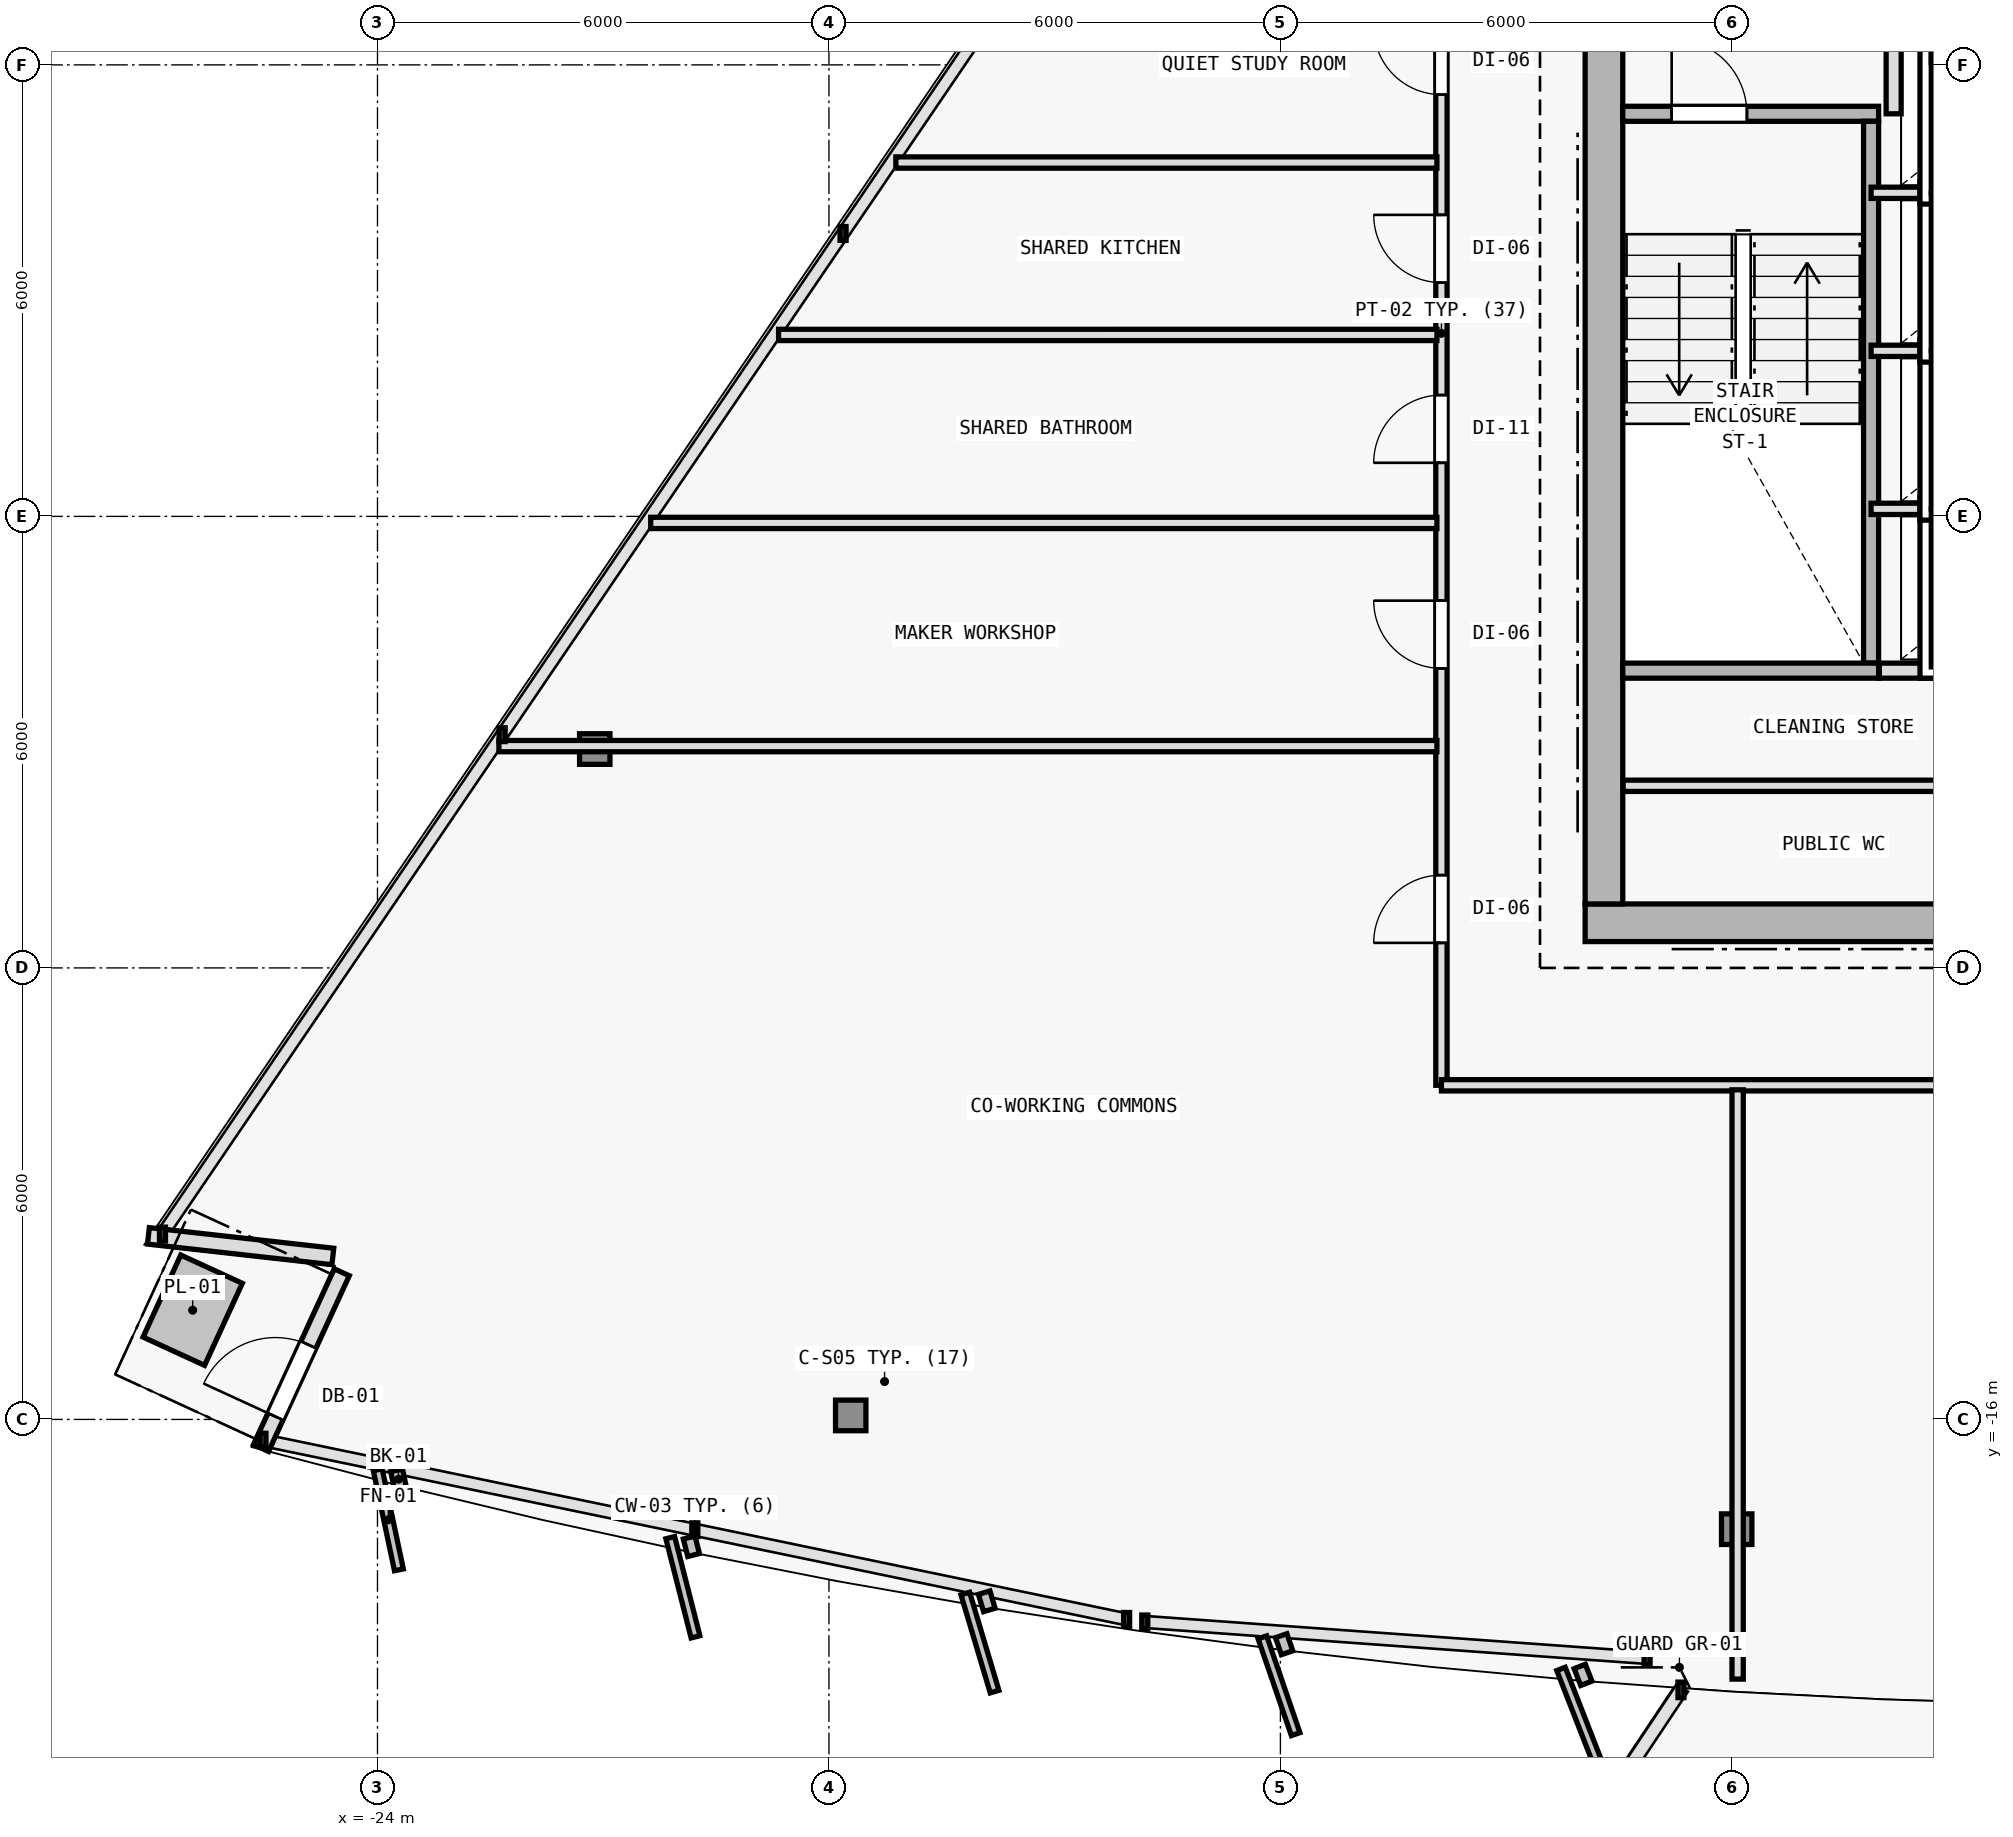
"""IFC4 building model, lengths in metres.
Left out: names, types, materials, properties, quantities, classifications, styles, units other than length and angle.
Written with IfcOpenShell. Run it as: python <this file> out.ifc"""

import sys

from ifc_helpers import new_model, si_unit, direction, frame, frame_2d, origin, origin_2d, place, context, subcontext, project, spatial, rectangle, i_section, extrude, element, fill, save


model = new_model("IFC4")
c1 = context("Model", 3, precision=1e-05, world=origin(), true_north=direction((0.0, 1.0)))
c2 = subcontext(c1, "Body", "Model", "MODEL_VIEW")
j1 = project(units=[si_unit("LENGTHUNIT", "METRE"), si_unit("PLANEANGLEUNIT", "RADIAN")], contexts=[c1])
p1 = place(None, origin())
s1 = spatial("IfcSite", under=j1, at=p1, CompositionType="ELEMENT")
p2 = place(p1, origin())
s2 = spatial("IfcBuilding", under=s1, at=p2, CompositionType="ELEMENT")
p3 = place(p2, frame((0.0, 0.0, 160.2)))
s3 = spatial("IfcBuildingStorey", under=s2, at=p3, CompositionType="ELEMENT", Elevation=160.2)
for number, where, z_axis, x_axis in (
    (1, (-7.7, -9.4, 0.0), (0.0, 0.0, 1.0), (1.0, 0.0, 0.0)),
    (2, (-7.7, 2.0, 0.0), (0.0, 0.0, 1.0), (1.0, 0.0, 0.0)),
):
    element("IfcColumn", number, at=place(p3, frame(where, z_axis=z_axis, x_axis=x_axis)), inside=s3, PredefinedType="COLUMN", context=c2, shape_type="SweptSolid", body=[
        extrude(i_section(OverallWidth=0.404, OverallDepth=0.407, WebThickness=0.017, FlangeThickness=0.028, FilletRadius=0.015, at=origin_2d()), origin(), (0.0, 0.0, 1.0), 3.6),
    ])
p4 = place(p3, frame((-17.711, -15.947, 0.006), z_axis=(0.020596292833, 0.033511459955, 0.999226087917), x_axis=(-0.851954850327, 0.523615252838, 0.0)))
e3 = element("IfcColumn", 3, at=p4, inside=s3, PredefinedType="COLUMN", context=c2, shape_type="SweptSolid", body=[
    extrude(i_section(OverallWidth=0.404, OverallDepth=0.407, WebThickness=0.017, FlangeThickness=0.028, FilletRadius=0.015, at=origin_2d()), origin(), (0.0, 0.0, 1.0), 3.592),
])
p5 = place(p3, frame((-5.936, -17.458, 0.006), z_axis=(0.006934288159, 0.035283289748, 0.999353293441), x_axis=(-0.981229659911, 0.192842823335, 0.0)))
e4 = element("IfcColumn", 4, at=p5, inside=s3, PredefinedType="COLUMN", context=c2, shape_type="SweptSolid", body=[
    extrude(i_section(OverallWidth=0.404, OverallDepth=0.407, WebThickness=0.017, FlangeThickness=0.028, FilletRadius=0.015, at=origin_2d()), origin(), (0.0, 0.0, 1.0), 3.591),
])
p6 = place(p3, frame((-21.112, -7.092, 0.006), z_axis=(0.025224163578, 0.021620711639, 0.999447990843), x_axis=(-0.650791373456, 0.759256602365, 0.0)))
e5 = element("IfcColumn", 5, at=p6, inside=s3, PredefinedType="COLUMN", context=c2, shape_type="SweptSolid", body=[
    extrude(i_section(OverallWidth=0.404, OverallDepth=0.407, WebThickness=0.017, FlangeThickness=0.028, FilletRadius=0.015, at=origin_2d()), origin(), (0.0, 0.0, 1.0), 3.591),
])
p7 = place(p3, frame((-24.594, -13.834, 0.0), z_axis=(0.0, 0.0, 1.0), x_axis=(-0.993823222634, 0.110974781609, 0.0)))
e6 = element("IfcWall", 6, at=p7, inside=s3, PredefinedType="SOLIDWALL", context=c2, shape_type="SweptSolid", body=[
    extrude(rectangle(XDim=2.466, YDim=0.22, at=frame_2d((1.233, 0.0))), origin(), (0.0, 0.0, 1.0), 3.35),
])
p8 = place(p3, frame((-25.548, -16.38, 0.0), z_axis=(0.0, 0.0, 1.0), x_axis=(0.417449299542, 0.908700215864, 0.0)))
e7 = element("IfcWall", 7, at=p8, inside=s3, PredefinedType="SOLIDWALL", context=c2, shape_type="SweptSolid", body=[
    extrude(rectangle(XDim=2.57, YDim=0.22, at=frame_2d((1.285, 0.0))), origin(), (0.0, 0.0, 1.0), 3.35),
])
p9 = place(p8, frame((0.46, 0.0, 0.0)))
e8 = element("IfcOpeningElement", 8, at=p9, cuts=e7, PredefinedType="OPENING", context=c2, shape_type="SweptSolid", body=[
    extrude(rectangle(XDim=1.05, YDim=2.15, at=frame_2d((0.525, 1.075))), frame((0.0, 0.12, 0.0), z_axis=(0.0, -1.0, 0.0), x_axis=(1.0, 0.0, 0.0)), (0.0, 0.0, 1.0), 0.24),
])
p10 = place(p3, frame((-7.95, -9.4, 0.0), z_axis=(0.0, 0.0, 1.0), x_axis=(1.0, 0.0, 0.0)))
e9 = element("IfcWall", 9, at=p10, inside=s3, PredefinedType="SHEAR", context=c2, shape_type="SweptSolid", body=[
    extrude(rectangle(XDim=15.9, YDim=0.5, at=frame_2d((7.95, 0.0))), origin(), (0.0, 0.0, 1.0), 3.35),
])
p11 = place(p10, frame((9.6, 0.0, 0.0)))
e10 = element("IfcOpeningElement", 10, at=p11, cuts=e9, PredefinedType="OPENING", context=c2, shape_type="SweptSolid", body=[
    extrude(rectangle(XDim=1.5, YDim=2.2, at=frame_2d((0.75, 1.1))), frame((0.0, 0.26, 0.0), z_axis=(0.0, -1.0, 0.0), x_axis=(1.0, 0.0, 0.0)), (0.0, 0.0, 1.0), 0.52),
])
p12 = place(p3, frame((-7.7, -9.15, 0.0), z_axis=(0.0, 0.0, 1.0), x_axis=(0.0, 1.0, 0.0)))
e11 = element("IfcWall", 11, at=p12, inside=s3, PredefinedType="SHEAR", context=c2, shape_type="SweptSolid", body=[
    extrude(rectangle(XDim=19.1, YDim=0.5, at=frame_2d((9.55, 0.0))), origin(), (0.0, 0.0, 1.0), 3.35),
])
p13 = place(p12, frame((12.7, 0.0, 0.0)))
e12 = element("IfcOpeningElement", 12, at=p13, cuts=e11, PredefinedType="OPENING", context=c2, shape_type="SweptSolid", body=[
    extrude(rectangle(XDim=1.1, YDim=2.15, at=frame_2d((0.55, 1.075))), frame((0.0, 0.26, 0.0), z_axis=(0.0, -1.0, 0.0), x_axis=(1.0, 0.0, 0.0)), (0.0, 0.0, 1.0), 0.52),
])
p14 = place(p3, frame((-7.45, 1.35, 0.0), z_axis=(0.0, 0.0, 1.0), x_axis=(1.0, 0.0, 0.0)))
e13 = element("IfcWall", 13, at=p14, inside=s3, PredefinedType="SOLIDWALL", context=c2, shape_type="SweptSolid", body=[
    extrude(rectangle(XDim=3.4, YDim=0.2, at=frame_2d((1.7, 0.0))), origin(), (0.0, 0.0, 1.0), 3.35),
])
p15 = place(p14, frame((0.65, 0.0, 0.0)))
e14 = element("IfcOpeningElement", 14, at=p15, cuts=e13, PredefinedType="OPENING", context=c2, shape_type="SweptSolid", body=[
    extrude(rectangle(XDim=1.0, YDim=2.15, at=frame_2d((0.5, 1.075))), frame((0.0, 0.11, 0.0), z_axis=(0.0, -1.0, 0.0), x_axis=(1.0, 0.0, 0.0)), (0.0, 0.0, 1.0), 0.22),
])
p16 = place(p3, frame((-4.15, -5.95, 0.0), z_axis=(0.0, 0.0, 1.0), x_axis=(0.0, 1.0, 0.0)))
e15 = element("IfcWall", 15, at=p16, inside=s3, PredefinedType="SOLIDWALL", context=c2, shape_type="SweptSolid", body=[
    extrude(rectangle(XDim=7.2, YDim=0.2, at=frame_2d((3.6, 0.0))), origin(), (0.0, 0.0, 1.0), 3.35),
])
p17 = place(p3, frame((-3.85, 1.35, 0.0), z_axis=(0.0, 0.0, 1.0), x_axis=(0.0, 1.0, 0.0)))
e16 = element("IfcWall", 16, at=p17, inside=s3, PredefinedType="SOLIDWALL", context=c2, shape_type="SweptSolid", body=[
    extrude(rectangle(XDim=8.595, YDim=0.2, at=frame_2d((4.297, 0.0))), origin(), (0.0, 0.0, 1.0), 3.35),
])
p18 = place(p17, frame((1.5, 0.0, 0.0)))
e17 = element("IfcOpeningElement", 17, at=p18, cuts=e16, PredefinedType="OPENING", context=c2, shape_type="SweptSolid", body=[
    extrude(rectangle(XDim=1.0, YDim=2.15, at=frame_2d((0.5, 1.075))), frame((0.0, 0.11, 0.0), z_axis=(0.0, -1.0, 0.0), x_axis=(1.0, 0.0, 0.0)), (0.0, 0.0, 1.0), 0.22),
])
p19 = place(p17, frame((3.18, 0.0, 0.0)))
e18 = element("IfcOpeningElement", 18, at=p19, cuts=e16, PredefinedType="OPENING", context=c2, shape_type="SweptSolid", body=[
    extrude(rectangle(XDim=1.0, YDim=2.15, at=frame_2d((0.5, 1.075))), frame((0.0, 0.11, 0.0), z_axis=(0.0, -1.0, 0.0), x_axis=(1.0, 0.0, 0.0)), (0.0, 0.0, 1.0), 0.22),
])
for number, where, z_axis, x_axis in (
    (19, (-4.15, -3.9, 0.0), (0.0, 0.0, 1.0), (1.0, 0.0, 0.0)),
    (20, (-4.15, -1.8, 0.0), (0.0, 0.0, 1.0), (1.0, 0.0, 0.0)),
    (21, (-4.15, 0.3, 0.0), (0.0, 0.0, 1.0), (1.0, 0.0, 0.0)),
):
    element("IfcWall", number, at=place(p3, frame(where, z_axis=z_axis, x_axis=x_axis)), inside=s3, PredefinedType="PARTITIONING", context=c2, shape_type="SweptSolid", body=[
        extrude(rectangle(XDim=2.9, YDim=0.15, at=frame_2d((1.45, 0.0))), origin(), (0.0, 0.0, 1.0), 3.35),
    ])
p20 = place(p3, frame((-7.45, -6.05, 0.0), z_axis=(0.0, 0.0, 1.0), x_axis=(1.0, 0.0, 0.0)))
e22 = element("IfcWall", 22, at=p20, inside=s3, PredefinedType="SOLIDWALL", context=c2, shape_type="SweptSolid", body=[
    extrude(rectangle(XDim=3.4, YDim=0.2, at=frame_2d((1.7, 0.0))), origin(), (0.0, 0.0, 1.0), 3.35),
])
p21 = place(p3, frame((-4.04, -6.05, 0.0), z_axis=(0.0, 0.0, 1.0), x_axis=(1.0, 0.0, 0.0)))
e23 = element("IfcWall", 23, at=p21, inside=s3, PredefinedType="SOLIDWALL", context=c2, shape_type="SweptSolid", body=[
    extrude(rectangle(XDim=2.79, YDim=0.2, at=frame_2d((1.395, 0.0))), origin(), (0.0, 0.0, 1.0), 3.35),
])
p22 = place(p3, frame((-7.445, -7.58, 0.0), z_axis=(0.0, 0.0, 1.0), x_axis=(1.0, 0.0, 0.0)))
e24 = element("IfcWall", 24, at=p22, inside=s3, PredefinedType="PARTITIONING", context=c2, shape_type="SweptSolid", body=[
    extrude(rectangle(XDim=6.195, YDim=0.15, at=frame_2d((3.098, 0.0))), origin(), (0.0, 0.0, 1.0), 3.35),
])
p23 = place(p3, frame((-9.86, -11.56, 0.0), z_axis=(0.0, 0.0, 1.0), x_axis=(0.0, 1.0, 0.0)))
e25 = element("IfcWall", 25, at=p23, inside=s3, PredefinedType="PARTITIONING", context=c2, shape_type="SweptSolid", body=[
    extrude(rectangle(XDim=19.986, YDim=0.15, at=frame_2d((9.993, 0.0))), origin(), (0.0, 0.0, 1.0), 2.825),
])
p24 = place(p23, frame((10.667, 0.0, 0.0)))
e26 = element("IfcOpeningElement", 26, at=p24, cuts=e25, PredefinedType="OPENING", context=c2, shape_type="SweptSolid", body=[
    extrude(rectangle(XDim=0.9, YDim=2.1, at=frame_2d((0.45, 1.05))), frame((0.0, 0.085, 0.0), z_axis=(0.0, -1.0, 0.0), x_axis=(1.0, 0.0, 0.0)), (0.0, 0.0, 1.0), 0.17),
])
p25 = place(p23, frame((8.272, 0.0, 0.0)))
e27 = element("IfcOpeningElement", 27, at=p25, cuts=e25, PredefinedType="OPENING", context=c2, shape_type="SweptSolid", body=[
    extrude(rectangle(XDim=0.9, YDim=2.1, at=frame_2d((0.45, 1.05))), frame((0.0, 0.085, 0.0), z_axis=(0.0, -1.0, 0.0), x_axis=(1.0, 0.0, 0.0)), (0.0, 0.0, 1.0), 0.17),
])
p26 = place(p23, frame((5.54, 0.0, 0.0)))
e28 = element("IfcOpeningElement", 28, at=p26, cuts=e25, PredefinedType="OPENING", context=c2, shape_type="SweptSolid", body=[
    extrude(rectangle(XDim=0.9, YDim=2.1, at=frame_2d((0.45, 1.05))), frame((0.0, 0.085, 0.0), z_axis=(0.0, -1.0, 0.0), x_axis=(1.0, 0.0, 0.0)), (0.0, 0.0, 1.0), 0.17),
])
p27 = place(p23, frame((1.893, 0.0, 0.0)))
e29 = element("IfcOpeningElement", 29, at=p27, cuts=e25, PredefinedType="OPENING", context=c2, shape_type="SweptSolid", body=[
    extrude(rectangle(XDim=0.9, YDim=2.1, at=frame_2d((0.45, 1.05))), frame((0.0, 0.085, 0.0), z_axis=(0.0, -1.0, 0.0), x_axis=(1.0, 0.0, 0.0)), (0.0, 0.0, 1.0), 0.17),
])
p28 = place(p23, frame((18.106, 0.0, 0.0)))
e30 = element("IfcOpeningElement", 30, at=p28, cuts=e25, PredefinedType="OPENING", context=c2, shape_type="SweptSolid", body=[
    extrude(rectangle(XDim=0.9, YDim=2.1, at=frame_2d((0.45, 1.05))), frame((0.0, 0.085, 0.0), z_axis=(0.0, -1.0, 0.0), x_axis=(1.0, 0.0, 0.0)), (0.0, 0.0, 1.0), 0.17),
])
p29 = place(p23, frame((15.686, 0.0, 0.0)))
e31 = element("IfcOpeningElement", 31, at=p29, cuts=e25, PredefinedType="OPENING", context=c2, shape_type="SweptSolid", body=[
    extrude(rectangle(XDim=0.9, YDim=2.1, at=frame_2d((0.45, 1.05))), frame((0.0, 0.085, 0.0), z_axis=(0.0, -1.0, 0.0), x_axis=(1.0, 0.0, 0.0)), (0.0, 0.0, 1.0), 0.17),
])
p30 = place(p23, frame((13.165, 0.0, 0.0)))
e32 = element("IfcOpeningElement", 32, at=p30, cuts=e25, PredefinedType="OPENING", context=c2, shape_type="SweptSolid", body=[
    extrude(rectangle(XDim=0.9, YDim=2.1, at=frame_2d((0.45, 1.05))), frame((0.0, 0.085, 0.0), z_axis=(0.0, -1.0, 0.0), x_axis=(1.0, 0.0, 0.0)), (0.0, 0.0, 1.0), 0.17),
])
p31 = place(p3, frame((13.18, -11.56, 0.0), z_axis=(0.0, 0.0, 1.0), x_axis=(-1.0, 0.0, 0.0)))
e33 = element("IfcWall", 33, at=p31, inside=s3, PredefinedType="PARTITIONING", context=c2, shape_type="SweptSolid", body=[
    extrude(rectangle(XDim=23.04, YDim=0.15, at=frame_2d((11.52, 0.0))), origin(), (0.0, 0.0, 1.0), 2.825),
])
p32 = place(p31, frame((12.73, 0.0, 0.0)))
e34 = element("IfcOpeningElement", 34, at=p32, cuts=e33, PredefinedType="OPENING", context=c2, shape_type="SweptSolid", body=[
    extrude(rectangle(XDim=0.9, YDim=2.1, at=frame_2d((0.45, 1.05))), frame((0.0, 0.085, 0.0), z_axis=(0.0, -1.0, 0.0), x_axis=(1.0, 0.0, 0.0)), (0.0, 0.0, 1.0), 0.17),
])
p33 = place(p31, frame((3.267, 0.0, 0.0)))
e35 = element("IfcOpeningElement", 35, at=p33, cuts=e33, PredefinedType="OPENING", context=c2, shape_type="SweptSolid", body=[
    extrude(rectangle(XDim=0.9, YDim=2.1, at=frame_2d((0.45, 1.05))), frame((0.0, 0.085, 0.0), z_axis=(0.0, -1.0, 0.0), x_axis=(1.0, 0.0, 0.0)), (0.0, 0.0, 1.0), 0.17),
])
p34 = place(p3, frame((-5.923, -11.62, 0.0), z_axis=(0.0, 0.0, 1.0), x_axis=(0.0, -1.0, 0.0)))
e36 = element("IfcWall", 36, at=p34, inside=s3, PredefinedType="PARTITIONING", context=c2, shape_type="SweptSolid", body=[
    extrude(rectangle(XDim=7.831, YDim=0.15, at=frame_2d((3.916, 0.0))), origin(), (0.0, 0.0, 1.0), 2.775),
])
p35 = place(p3, frame((-9.92, -7.053, 0.0), z_axis=(0.0, 0.0, 1.0), x_axis=(-1.0, 0.0, 0.0)))
e37 = element("IfcWall", 37, at=p35, inside=s3, PredefinedType="PARTITIONING", context=c2, shape_type="SweptSolid", body=[
    extrude(rectangle(XDim=12.467, YDim=0.15, at=frame_2d((6.233, 0.0))), origin(), (0.0, 0.0, 1.0), 2.825),
])
p36 = place(p3, frame((-9.92, -1.589, 0.0), z_axis=(0.0, 0.0, 1.0), x_axis=(-1.0, 0.0, 0.0)))
e38 = element("IfcWall", 38, at=p36, inside=s3, PredefinedType="PARTITIONING", context=c2, shape_type="SweptSolid", body=[
    extrude(rectangle(XDim=8.75, YDim=0.15, at=frame_2d((4.375, 0.0))), origin(), (0.0, 0.0, 1.0), 2.935),
])
p37 = place(p3, frame((-9.92, -4.087, 0.0), z_axis=(0.0, 0.0, 1.0), x_axis=(-1.0, 0.0, 0.0)))
e39 = element("IfcWall", 39, at=p37, inside=s3, PredefinedType="PARTITIONING", context=c2, shape_type="SweptSolid", body=[
    extrude(rectangle(XDim=10.449, YDim=0.15, at=frame_2d((5.225, 0.0))), origin(), (0.0, 0.0, 1.0), 2.935),
])
p38 = place(p3, frame((-9.92, 0.702, 0.0), z_axis=(0.0, 0.0, 1.0), x_axis=(-1.0, 0.0, 0.0)))
e40 = element("IfcWall", 40, at=p38, inside=s3, PredefinedType="PARTITIONING", context=c2, shape_type="SweptSolid", body=[
    extrude(rectangle(XDim=7.191, YDim=0.15, at=frame_2d((3.595, 0.0))), origin(), (0.0, 0.0, 1.0), 2.935),
])
p39 = place(p9, origin())
e41 = element("IfcDoor", 41, at=p39, inside=s3, OperationType="SINGLE_SWING_LEFT", PredefinedType="DOOR", context=c2, shape_type="SweptSolid", body=[
    extrude(rectangle(XDim=1.05, YDim=2.15, at=frame_2d((0.525, 1.075))), frame((0.0, 0.025, 0.0), z_axis=(0.0, -1.0, 0.0), x_axis=(1.0, 0.0, 0.0)), (0.0, 0.0, 1.0), 0.05),
])
fill(e8, e41)
p40 = place(p15, origin())
e42 = element("IfcDoor", 42, at=p40, inside=s3, OperationType="SINGLE_SWING_LEFT", PredefinedType="DOOR", context=c2, shape_type="SweptSolid", body=[
    extrude(rectangle(XDim=1.0, YDim=2.15, at=frame_2d((0.5, 1.075))), frame((0.0, 0.025, 0.0), z_axis=(0.0, -1.0, 0.0), x_axis=(1.0, 0.0, 0.0)), (0.0, 0.0, 1.0), 0.05),
])
fill(e14, e42)
p41 = place(p24, origin())
e43 = element("IfcDoor", 43, at=p41, inside=s3, OperationType="SINGLE_SWING_RIGHT", PredefinedType="DOOR", context=c2, shape_type="SweptSolid", body=[
    extrude(rectangle(XDim=0.9, YDim=2.1, at=frame_2d((0.45, 1.05))), frame((0.0, 0.025, 0.0), z_axis=(0.0, -1.0, 0.0), x_axis=(1.0, 0.0, 0.0)), (0.0, 0.0, 1.0), 0.05),
])
fill(e26, e43)
p42 = place(p25, origin())
e44 = element("IfcDoor", 44, at=p42, inside=s3, OperationType="SINGLE_SWING_LEFT", PredefinedType="DOOR", context=c2, shape_type="SweptSolid", body=[
    extrude(rectangle(XDim=0.9, YDim=2.1, at=frame_2d((0.45, 1.05))), frame((0.0, 0.025, 0.0), z_axis=(0.0, -1.0, 0.0), x_axis=(1.0, 0.0, 0.0)), (0.0, 0.0, 1.0), 0.05),
])
fill(e27, e44)
p43 = place(p26, origin())
e45 = element("IfcDoor", 45, at=p43, inside=s3, OperationType="SINGLE_SWING_RIGHT", PredefinedType="DOOR", context=c2, shape_type="SweptSolid", body=[
    extrude(rectangle(XDim=0.9, YDim=2.1, at=frame_2d((0.45, 1.05))), frame((0.0, 0.025, 0.0), z_axis=(0.0, -1.0, 0.0), x_axis=(1.0, 0.0, 0.0)), (0.0, 0.0, 1.0), 0.05),
])
fill(e28, e45)
p44 = place(p27, origin())
e46 = element("IfcDoor", 46, at=p44, inside=s3, OperationType="SINGLE_SWING_LEFT", PredefinedType="DOOR", context=c2, shape_type="SweptSolid", body=[
    extrude(rectangle(XDim=0.9, YDim=2.1, at=frame_2d((0.45, 1.05))), frame((0.0, 0.025, 0.0), z_axis=(0.0, -1.0, 0.0), x_axis=(1.0, 0.0, 0.0)), (0.0, 0.0, 1.0), 0.05),
])
fill(e29, e46)
p45 = place(p30, origin())
e47 = element("IfcDoor", 47, at=p45, inside=s3, OperationType="SINGLE_SWING_RIGHT", PredefinedType="DOOR", context=c2, shape_type="SweptSolid", body=[
    extrude(rectangle(XDim=0.9, YDim=2.1, at=frame_2d((0.45, 1.05))), frame((0.0, 0.025, 0.0), z_axis=(0.0, -1.0, 0.0), x_axis=(1.0, 0.0, 0.0)), (0.0, 0.0, 1.0), 0.05),
])
fill(e32, e47)
save(model, sys.argv[1])
